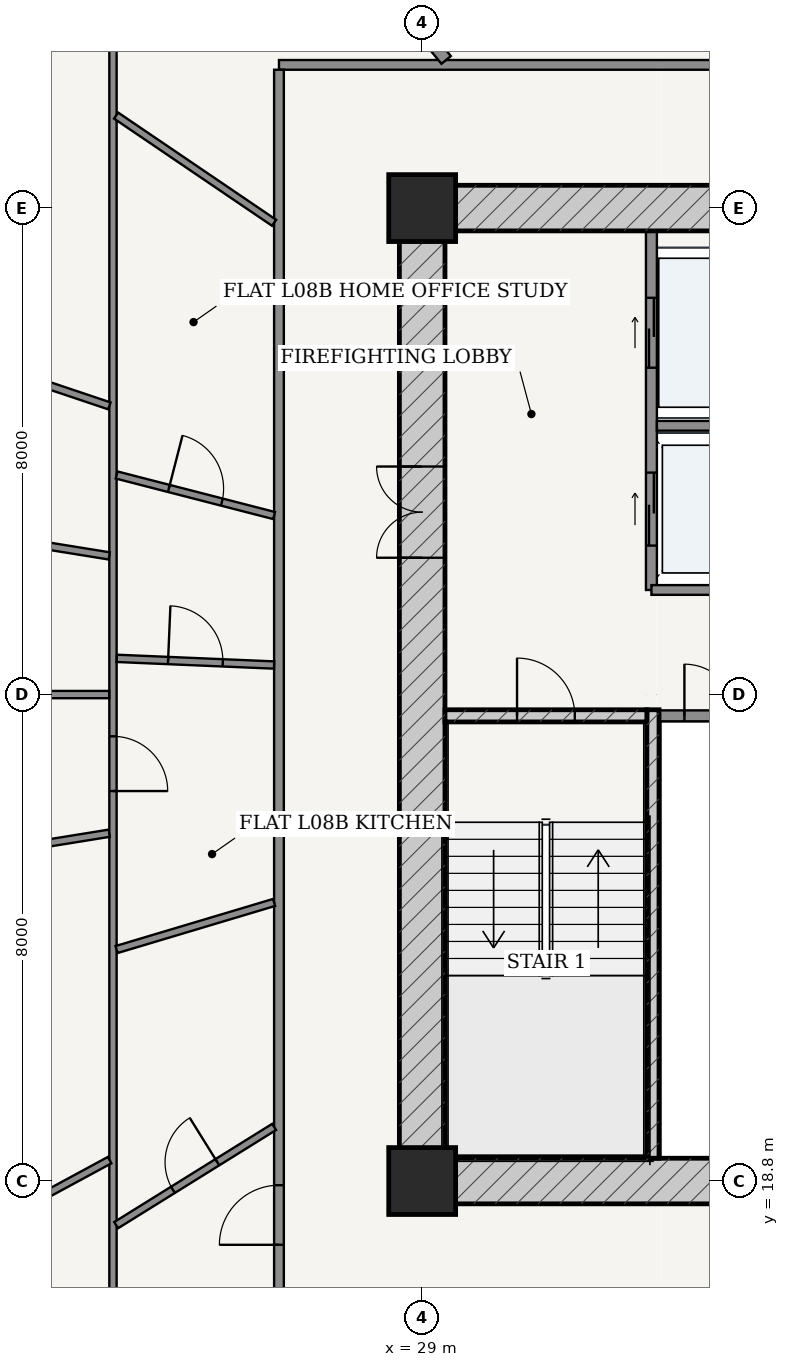
"""IFC4 building model, lengths in metres.
Left out: names, types, materials, properties, quantities, classifications, styles, units other than length and angle.
Written with IfcOpenShell. Run it as: python <this file> out.ifc"""

import sys

from ifc_helpers import new_model, si_unit, direction, frame, frame_2d, origin, origin_2d, place, context, subcontext, project, spatial, rectangle, extrude, source, transform, mapped, element, fill, save


model = new_model("IFC4")
c1 = context("Model", 3, precision=1e-05, world=origin(), true_north=direction((-0.2419218956, 0.970295726276)))
c2 = subcontext(c1, "Body", "Model", "MODEL_VIEW")
j1 = project(units=[si_unit("LENGTHUNIT", "METRE"), si_unit("PLANEANGLEUNIT", "RADIAN")], contexts=[c1])
p1 = place(None, origin())
s1 = spatial("IfcSite", under=j1, at=p1, CompositionType="ELEMENT")
p2 = place(p1, origin())
s2 = spatial("IfcBuilding", under=s1, at=p2, CompositionType="ELEMENT")
p3 = place(p2, frame((0.0, 0.0, 34.8)))
s3 = spatial("IfcBuildingStorey", under=s2, at=p3, CompositionType="ELEMENT", Elevation=34.8)
for number, where, z_axis, x_axis in (
    (1, (29.0, 18.8, 0.0), (0.0, 0.0, 1.0), (1.0, 0.0, 0.0)),
    (2, (29.0, 34.8, 0.0), (0.0, 0.0, 1.0), (1.0, 0.0, 0.0)),
):
    element("IfcColumn", number, at=place(p3, frame(where, z_axis=z_axis, x_axis=x_axis)), inside=s3, PredefinedType="COLUMN", context=c2, shape_type="SweptSolid", body=[
        extrude(rectangle(XDim=1.1, YDim=1.1, at=origin_2d()), origin(), (0.0, 0.0, 1.0), 3.6),
    ])
p4 = place(p3, frame((28.625, 18.8, 0.0), z_axis=(0.0, 0.0, 1.0), x_axis=(1.0, 0.0, 0.0)))
e3 = element("IfcWall", 3, at=p4, inside=s3, PredefinedType="SHEAR", context=c2, shape_type="SweptSolid", body=[
    extrude(rectangle(XDim=18.75, YDim=0.75, at=frame_2d((9.375, 0.0))), origin(), (0.0, 0.0, 1.0), 3.32),
])
p5 = place(p4, frame((6.927, 0.0, 0.0)))
e4 = element("IfcOpeningElement", 4, at=p5, cuts=e3, PredefinedType="OPENING", context=c2, shape_type="SweptSolid", body=[
    extrude(rectangle(XDim=0.85, YDim=2.1, at=frame_2d((0.425, 1.05))), frame((0.0, 0.385, 0.0), z_axis=(0.0, -1.0, 0.0), x_axis=(1.0, 0.0, 0.0)), (0.0, 0.0, 1.0), 0.77),
])
p6 = place(p4, frame((8.95, 0.0, 0.0)))
e5 = element("IfcOpeningElement", 5, at=p6, cuts=e3, PredefinedType="OPENING", context=c2, shape_type="SweptSolid", body=[
    extrude(rectangle(XDim=0.85, YDim=2.1, at=frame_2d((0.425, 1.05))), frame((0.0, 0.385, 0.0), z_axis=(0.0, -1.0, 0.0), x_axis=(1.0, 0.0, 0.0)), (0.0, 0.0, 1.0), 0.77),
])
p7 = place(p4, frame((10.972, 0.0, 0.0)))
e6 = element("IfcOpeningElement", 6, at=p7, cuts=e3, PredefinedType="OPENING", context=c2, shape_type="SweptSolid", body=[
    extrude(rectangle(XDim=0.85, YDim=2.1, at=frame_2d((0.425, 1.05))), frame((0.0, 0.385, 0.0), z_axis=(0.0, -1.0, 0.0), x_axis=(1.0, 0.0, 0.0)), (0.0, 0.0, 1.0), 0.77),
])
p8 = place(p3, frame((28.625, 34.8, 0.0), z_axis=(0.0, 0.0, 1.0), x_axis=(1.0, 0.0, 0.0)))
e7 = element("IfcWall", 7, at=p8, inside=s3, PredefinedType="SHEAR", context=c2, shape_type="SweptSolid", body=[
    extrude(rectangle(XDim=18.75, YDim=0.75, at=frame_2d((9.375, 0.0))), origin(), (0.0, 0.0, 1.0), 3.32),
])
p9 = place(p8, frame((7.407, 0.0, 0.0)))
e8 = element("IfcOpeningElement", 8, at=p9, cuts=e7, PredefinedType="OPENING", context=c2, shape_type="SweptSolid", body=[
    extrude(rectangle(XDim=0.86, YDim=2.1, at=frame_2d((0.43, 1.05))), frame((0.0, 0.385, 0.0), z_axis=(0.0, -1.0, 0.0), x_axis=(1.0, 0.0, 0.0)), (0.0, 0.0, 1.0), 0.77),
])
p10 = place(p8, frame((10.488, 0.0, 0.0)))
e9 = element("IfcOpeningElement", 9, at=p10, cuts=e7, PredefinedType="OPENING", context=c2, shape_type="SweptSolid", body=[
    extrude(rectangle(XDim=0.85, YDim=2.1, at=frame_2d((0.425, 1.05))), frame((0.0, 0.385, 0.0), z_axis=(0.0, -1.0, 0.0), x_axis=(1.0, 0.0, 0.0)), (0.0, 0.0, 1.0), 0.77),
])
p11 = place(p3, frame((29.0, 19.175, 0.0), z_axis=(0.0, 0.0, 1.0), x_axis=(0.0, 1.0, 0.0)))
e10 = element("IfcWall", 10, at=p11, inside=s3, PredefinedType="SHEAR", context=c2, shape_type="SweptSolid", body=[
    extrude(rectangle(XDim=15.25, YDim=0.75, at=frame_2d((7.625, 0.0))), origin(), (0.0, 0.0, 1.0), 3.32),
])
p12 = place(p11, frame((9.875, 0.0, 0.0)))
e11 = element("IfcOpeningElement", 11, at=p12, cuts=e10, PredefinedType="OPENING", context=c2, shape_type="SweptSolid", body=[
    extrude(rectangle(XDim=1.5, YDim=2.2, at=frame_2d((0.75, 1.1))), frame((0.0, 0.385, 0.0), z_axis=(0.0, -1.0, 0.0), x_axis=(1.0, 0.0, 0.0)), (0.0, 0.0, 1.0), 0.77),
])
p13 = place(p3, frame((32.795, 19.175, 0.0), z_axis=(0.0, 0.0, 1.0), x_axis=(0.0, 1.0, 0.0)))
e12 = element("IfcWall", 12, at=p13, inside=s3, PredefinedType="SOLIDWALL", context=c2, shape_type="SweptSolid", body=[
    extrude(rectangle(XDim=7.375, YDim=0.2, at=frame_2d((3.688, 0.0))), origin(), (0.0, 0.0, 1.0), 3.32),
])
p14 = place(p3, frame((29.375, 26.45, 0.0), z_axis=(0.0, 0.0, 1.0), x_axis=(1.0, 0.0, 0.0)))
e13 = element("IfcWall", 13, at=p14, inside=s3, PredefinedType="SOLIDWALL", context=c2, shape_type="SweptSolid", body=[
    extrude(rectangle(XDim=3.32, YDim=0.2, at=frame_2d((1.66, 0.0))), origin(), (0.0, 0.0, 1.0), 3.32),
])
p15 = place(p14, frame((1.185, 0.0, 0.0)))
e14 = element("IfcOpeningElement", 14, at=p15, cuts=e13, PredefinedType="OPENING", context=c2, shape_type="SweptSolid", body=[
    extrude(rectangle(XDim=0.95, YDim=2.15, at=frame_2d((0.475, 1.075))), frame((0.0, 0.11, 0.0), z_axis=(0.0, -1.0, 0.0), x_axis=(1.0, 0.0, 0.0)), (0.0, 0.0, 1.0), 0.22),
])
p16 = place(p3, frame((32.9, 26.45, 0.0), z_axis=(0.0, 0.0, 1.0), x_axis=(1.0, 0.0, 0.0)))
e15 = element("IfcWall", 15, at=p16, inside=s3, PredefinedType="PARTITIONING", context=c2, shape_type="SweptSolid", body=[
    extrude(rectangle(XDim=1.675, YDim=0.18, at=frame_2d((0.837, 0.0))), origin(), (0.0, 0.0, 1.0), 3.32),
])
p17 = place(p16, frame((0.413, 0.0, 0.0)))
e16 = element("IfcOpeningElement", 16, at=p17, cuts=e15, PredefinedType="OPENING", context=c2, shape_type="SweptSolid", body=[
    extrude(rectangle(XDim=0.85, YDim=2.1, at=frame_2d((0.425, 1.05))), frame((0.0, 0.1, 0.0), z_axis=(0.0, -1.0, 0.0), x_axis=(1.0, 0.0, 0.0)), (0.0, 0.0, 1.0), 0.2),
])
p18 = place(p3, frame((32.77, 28.52, 0.0), z_axis=(0.0, 0.0, 1.0), x_axis=(0.0, 1.0, 0.0)))
e17 = element("IfcWall", 17, at=p18, inside=s3, PredefinedType="PARTITIONING", context=c2, shape_type="SweptSolid", body=[
    extrude(rectangle(XDim=5.905, YDim=0.18, at=frame_2d((2.953, 0.0))), origin(), (0.0, 0.0, 1.0), 3.32),
])
p19 = place(p18, frame((3.655, 0.0, 0.0)))
e18 = element("IfcOpeningElement", 18, at=p19, cuts=e17, PredefinedType="OPENING", context=c2, shape_type="SweptSolid", body=[
    extrude(rectangle(XDim=1.15, YDim=2.2, at=frame_2d((0.575, 1.1))), frame((0.0, 0.1, 0.0), z_axis=(0.0, -1.0, 0.0), x_axis=(1.0, 0.0, 0.0)), (0.0, 0.0, 1.0), 0.2),
])
p20 = place(p18, frame((0.73, 0.0, 0.0)))
e19 = element("IfcOpeningElement", 19, at=p20, cuts=e17, PredefinedType="OPENING", context=c2, shape_type="SweptSolid", body=[
    extrude(rectangle(XDim=1.2, YDim=2.25, at=frame_2d((0.6, 1.125))), frame((0.0, 0.1, 0.0), z_axis=(0.0, -1.0, 0.0), x_axis=(1.0, 0.0, 0.0)), (0.0, 0.0, 1.0), 0.2),
])
p21 = place(p3, frame((32.86, 31.22, 0.0), z_axis=(0.0, 0.0, 1.0), x_axis=(1.0, 0.0, 0.0)))
e20 = element("IfcWall", 20, at=p21, inside=s3, PredefinedType="PARTITIONING", context=c2, shape_type="SweptSolid", body=[
    extrude(rectangle(XDim=1.715, YDim=0.16, at=frame_2d((0.857, 0.0))), origin(), (0.0, 0.0, 1.0), 3.32),
])
p22 = place(p3, frame((32.77, 28.52, 0.0), z_axis=(0.0, 0.0, 1.0), x_axis=(1.0, 0.0, 0.0)))
e21 = element("IfcWall", 21, at=p22, inside=s3, PredefinedType="PARTITIONING", context=c2, shape_type="SweptSolid", body=[
    extrude(rectangle(XDim=1.805, YDim=0.16, at=frame_2d((0.902, 0.0))), origin(), (0.0, 0.0, 1.0), 3.32),
])
p23 = place(p3, frame((26.645, 37.155, 0.0), z_axis=(0.0, 0.0, 1.0), x_axis=(1.0, 0.0, 0.0)))
e22 = element("IfcWall", 22, at=p23, inside=s3, PredefinedType="PARTITIONING", context=c2, shape_type="SweptSolid", body=[
    extrude(rectangle(XDim=22.71, YDim=0.16, at=frame_2d((11.355, 0.0))), origin(), (0.0, 0.0, 1.0), 2.688),
])
p24 = place(p3, frame((26.645, 16.525, 0.0), z_axis=(0.0, 0.0, 1.0), x_axis=(0.0, 1.0, 0.0)))
e23 = element("IfcWall", 23, at=p24, inside=s3, PredefinedType="PARTITIONING", context=c2, shape_type="SweptSolid", body=[
    extrude(rectangle(XDim=20.55, YDim=0.16, at=frame_2d((10.275, 0.0))), origin(), (0.0, 0.0, 1.0), 2.688),
])
p25 = place(p24, frame((1.226, 0.0, 0.0)))
e24 = element("IfcOpeningElement", 24, at=p25, cuts=e23, PredefinedType="OPENING", context=c2, shape_type="SweptSolid", body=[
    extrude(rectangle(XDim=0.98, YDim=2.2, at=frame_2d((0.49, 1.1))), frame((0.0, 0.09, 0.0), z_axis=(0.0, -1.0, 0.0), x_axis=(1.0, 0.0, 0.0)), (0.0, 0.0, 1.0), 0.18),
])
p26 = place(p3, frame((34.549, 37.237, 0.0), z_axis=(0.0, 0.0, 1.0), x_axis=(-0.313863409377, 0.949468145992, 0.0)))
e25 = element("IfcWall", 25, at=p26, inside=s3, PredefinedType="PARTITIONING", context=c2, shape_type="SweptSolid", body=[
    extrude(rectangle(XDim=2.727, YDim=0.12, at=frame_2d((1.364, 0.0))), origin(), (0.0, 0.0, 1.0), 3.32),
])
p27 = place(p26, frame((0.934, 0.0, 0.0)))
e26 = element("IfcOpeningElement", 26, at=p27, cuts=e25, PredefinedType="OPENING", context=c2, shape_type="SweptSolid", body=[
    extrude(rectangle(XDim=0.86, YDim=2.15, at=frame_2d((0.43, 1.075))), frame((0.0, 0.07, 0.0), z_axis=(0.0, -1.0, 0.0), x_axis=(1.0, 0.0, 0.0)), (0.0, 0.0, 1.0), 0.14),
])
p28 = place(p3, frame((29.395, 37.237, 0.0), z_axis=(0.0, 0.0, 1.0), x_axis=(-0.636195770442, 0.77152766747, 0.0)))
e27 = element("IfcWall", 27, at=p28, inside=s3, PredefinedType="PARTITIONING", context=c2, shape_type="SweptSolid", body=[
    extrude(rectangle(XDim=11.681, YDim=0.2, at=frame_2d((5.84, 0.0))), origin(), (0.0, 0.0, 1.0), 2.688),
])
p29 = place(p3, frame((23.915, 13.715, 0.0), z_axis=(0.0, 0.0, 1.0), x_axis=(0.0, 1.0, 0.0)))
e28 = element("IfcWall", 28, at=p29, inside=s3, PredefinedType="PARTITIONING", context=c2, shape_type="SweptSolid", body=[
    extrude(rectangle(XDim=26.17, YDim=0.12, at=frame_2d((13.085, 0.0))), origin(), (0.0, 0.0, 1.0), 2.688),
])
p30 = place(p29, frame((1.895, 0.0, 0.0)))
e29 = element("IfcOpeningElement", 29, at=p30, cuts=e28, PredefinedType="OPENING", context=c2, shape_type="SweptSolid", body=[
    extrude(rectangle(XDim=0.9, YDim=2.15, at=frame_2d((0.45, 1.075))), frame((0.0, 0.07, 0.0), z_axis=(0.0, -1.0, 0.0), x_axis=(1.0, 0.0, 0.0)), (0.0, 0.0, 1.0), 0.14),
])
p31 = place(p29, frame((11.498, 0.0, 0.0)))
e30 = element("IfcOpeningElement", 30, at=p31, cuts=e28, PredefinedType="OPENING", context=c2, shape_type="SweptSolid", body=[
    extrude(rectangle(XDim=0.9, YDim=2.15, at=frame_2d((0.45, 1.075))), frame((0.0, 0.07, 0.0), z_axis=(0.0, -1.0, 0.0), x_axis=(1.0, 0.0, 0.0)), (0.0, 0.0, 1.0), 0.14),
])
p32 = place(p29, frame((23.831, 0.0, 0.0)))
e31 = element("IfcOpeningElement", 31, at=p32, cuts=e28, PredefinedType="OPENING", context=c2, shape_type="SweptSolid", body=[
    extrude(rectangle(XDim=0.86, YDim=2.15, at=frame_2d((0.43, 1.075))), frame((0.0, 0.07, 0.0), z_axis=(0.0, -1.0, 0.0), x_axis=(1.0, 0.0, 0.0)), (0.0, 0.0, 1.0), 0.14),
])
p33 = place(p3, frame((23.856, 31.547, 0.0), z_axis=(0.0, 0.0, 1.0), x_axis=(-0.948017487737, 0.318218231634, 0.0)))
e32 = element("IfcWall", 32, at=p33, inside=s3, PredefinedType="PARTITIONING", context=c2, shape_type="SweptSolid", body=[
    extrude(rectangle(XDim=13.279, YDim=0.12, at=frame_2d((6.639, 0.0))), origin(), (0.0, 0.0, 1.0), 2.762),
])
p34 = place(p33, frame((6.189, 0.0, 0.0)))
e33 = element("IfcOpeningElement", 33, at=p34, cuts=e32, PredefinedType="OPENING", context=c2, shape_type="SweptSolid", body=[
    extrude(rectangle(XDim=0.9, YDim=2.15, at=frame_2d((0.45, 1.075))), frame((0.0, 0.07, 0.0), z_axis=(0.0, -1.0, 0.0), x_axis=(1.0, 0.0, 0.0)), (0.0, 0.0, 1.0), 0.14),
])
p35 = place(p3, frame((23.854, 29.08, 0.0), z_axis=(0.0, 0.0, 1.0), x_axis=(-0.987255773689, 0.159141563768, 0.0)))
e34 = element("IfcWall", 34, at=p35, inside=s3, PredefinedType="PARTITIONING", context=c2, shape_type="SweptSolid", body=[
    extrude(rectangle(XDim=14.359, YDim=0.12, at=frame_2d((7.18, 0.0))), origin(), (0.0, 0.0, 1.0), 2.688),
])
p36 = place(p35, frame((5.66, 0.0, 0.0)))
e35 = element("IfcOpeningElement", 35, at=p36, cuts=e34, PredefinedType="OPENING", context=c2, shape_type="SweptSolid", body=[
    extrude(rectangle(XDim=0.9, YDim=2.15, at=frame_2d((0.45, 1.075))), frame((0.0, 0.07, 0.0), z_axis=(0.0, -1.0, 0.0), x_axis=(1.0, 0.0, 0.0)), (0.0, 0.0, 1.0), 0.14),
])
p37 = place(p3, frame((23.853, 26.8, 0.0), z_axis=(0.0, 0.0, 1.0), x_axis=(-1.0, 0.0, 0.0)))
e36 = element("IfcWall", 36, at=p37, inside=s3, PredefinedType="PARTITIONING", context=c2, shape_type="SweptSolid", body=[
    extrude(rectangle(XDim=14.793, YDim=0.12, at=frame_2d((7.396, 0.0))), origin(), (0.0, 0.0, 1.0), 2.762),
])
p38 = place(p37, frame((6.947, 0.0, 0.0)))
e37 = element("IfcOpeningElement", 37, at=p38, cuts=e36, PredefinedType="OPENING", context=c2, shape_type="SweptSolid", body=[
    extrude(rectangle(XDim=0.9, YDim=2.15, at=frame_2d((0.45, 1.075))), frame((0.0, 0.07, 0.0), z_axis=(0.0, -1.0, 0.0), x_axis=(1.0, 0.0, 0.0)), (0.0, 0.0, 1.0), 0.14),
])
p39 = place(p3, frame((23.854, 24.52, 0.0), z_axis=(0.0, 0.0, 1.0), x_axis=(-0.987258444847, -0.159124991997, 0.0)))
e38 = element("IfcWall", 38, at=p39, inside=s3, PredefinedType="PARTITIONING", context=c2, shape_type="SweptSolid", body=[
    extrude(rectangle(XDim=14.359, YDim=0.12, at=frame_2d((7.18, 0.0))), origin(), (0.0, 0.0, 1.0), 2.688),
])
p40 = place(p39, frame((5.659, 0.0, 0.0)))
e39 = element("IfcOpeningElement", 39, at=p40, cuts=e38, PredefinedType="OPENING", context=c2, shape_type="SweptSolid", body=[
    extrude(rectangle(XDim=0.9, YDim=2.15, at=frame_2d((0.45, 1.075))), frame((0.0, 0.07, 0.0), z_axis=(0.0, -1.0, 0.0), x_axis=(1.0, 0.0, 0.0)), (0.0, 0.0, 1.0), 0.14),
])
p41 = place(p3, frame((23.861, 19.144, 0.0), z_axis=(0.0, 0.0, 1.0), x_axis=(-0.879372452045, -0.476134529922, 0.0)))
e40 = element("IfcWall", 40, at=p41, inside=s3, PredefinedType="PARTITIONING", context=c2, shape_type="SweptSolid", body=[
    extrude(rectangle(XDim=11.219, YDim=0.12, at=frame_2d((5.61, 0.0))), origin(), (0.0, 0.0, 1.0), 2.688),
])
p42 = place(p41, frame((4.097, 0.0, 0.0)))
e41 = element("IfcOpeningElement", 41, at=p42, cuts=e40, PredefinedType="OPENING", context=c2, shape_type="SweptSolid", body=[
    extrude(rectangle(XDim=0.9, YDim=2.15, at=frame_2d((0.45, 1.075))), frame((0.0, 0.07, 0.0), z_axis=(0.0, -1.0, 0.0), x_axis=(1.0, 0.0, 0.0)), (0.0, 0.0, 1.0), 0.14),
])
p43 = place(p3, frame((26.565, 34.558, 0.0), z_axis=(0.0, 0.0, 1.0), x_axis=(-0.827501574847, 0.561463394734, 0.0)))
e42 = element("IfcWall", 42, at=p43, inside=s3, PredefinedType="PARTITIONING", context=c2, shape_type="SweptSolid", body=[
    extrude(rectangle(XDim=3.14, YDim=0.12, at=frame_2d((1.57, 0.0))), origin(), (0.0, 0.0, 1.0), 3.32),
])
p44 = place(p3, frame((26.565, 29.744, 0.0), z_axis=(0.0, 0.0, 1.0), x_axis=(-0.968421803088, 0.249317490972, 0.0)))
e43 = element("IfcWall", 43, at=p44, inside=s3, PredefinedType="PARTITIONING", context=c2, shape_type="SweptSolid", body=[
    extrude(rectangle(XDim=2.674, YDim=0.12, at=frame_2d((1.337, 0.0))), origin(), (0.0, 0.0, 1.0), 3.32),
])
p45 = place(p44, frame((0.887, 0.0, 0.0)))
e44 = element("IfcOpeningElement", 44, at=p45, cuts=e43, PredefinedType="OPENING", context=c2, shape_type="SweptSolid", body=[
    extrude(rectangle(XDim=0.9, YDim=2.15, at=frame_2d((0.45, 1.075))), frame((0.0, 0.07, 0.0), z_axis=(0.0, -1.0, 0.0), x_axis=(1.0, 0.0, 0.0)), (0.0, 0.0, 1.0), 0.14),
])
p46 = place(p3, frame((26.565, 27.286, 0.0), z_axis=(0.0, 0.0, 1.0), x_axis=(-0.999100094808, 0.042414626666, 0.0)))
e45 = element("IfcWall", 45, at=p46, inside=s3, PredefinedType="PARTITIONING", context=c2, shape_type="SweptSolid", body=[
    extrude(rectangle(XDim=2.59, YDim=0.12, at=frame_2d((1.295, 0.0))), origin(), (0.0, 0.0, 1.0), 3.32),
])
p47 = place(p46, frame((0.845, 0.0, 0.0)))
e46 = element("IfcOpeningElement", 46, at=p47, cuts=e45, PredefinedType="OPENING", context=c2, shape_type="SweptSolid", body=[
    extrude(rectangle(XDim=0.9, YDim=2.15, at=frame_2d((0.45, 1.075))), frame((0.0, 0.07, 0.0), z_axis=(0.0, -1.0, 0.0), x_axis=(1.0, 0.0, 0.0)), (0.0, 0.0, 1.0), 0.14),
])
p48 = place(p3, frame((26.565, 23.382, 0.0), z_axis=(0.0, 0.0, 1.0), x_axis=(-0.958081868855, -0.286494559408, 0.0)))
e47 = element("IfcWall", 47, at=p48, inside=s3, PredefinedType="PARTITIONING", context=c2, shape_type="SweptSolid", body=[
    extrude(rectangle(XDim=2.704, YDim=0.12, at=frame_2d((1.352, 0.0))), origin(), (0.0, 0.0, 1.0), 3.32),
])
p49 = place(p3, frame((26.565, 19.69, 0.0), z_axis=(0.0, 0.0, 1.0), x_axis=(-0.849229217796, -0.52802437031, 0.0)))
e48 = element("IfcWall", 48, at=p49, inside=s3, PredefinedType="PARTITIONING", context=c2, shape_type="SweptSolid", body=[
    extrude(rectangle(XDim=3.059, YDim=0.12, at=frame_2d((1.529, 0.0))), origin(), (0.0, 0.0, 1.0), 3.32),
])
p50 = place(p49, frame((1.099, 0.0, 0.0)))
e49 = element("IfcOpeningElement", 49, at=p50, cuts=e48, PredefinedType="OPENING", context=c2, shape_type="SweptSolid", body=[
    extrude(rectangle(XDim=0.86, YDim=2.15, at=frame_2d((0.43, 1.075))), frame((0.0, 0.07, 0.0), z_axis=(0.0, -1.0, 0.0), x_axis=(1.0, 0.0, 0.0)), (0.0, 0.0, 1.0), 0.14),
])
m1 = source(origin(), c2, "Body", "SweptSolid", [
    extrude(rectangle(XDim=1.5, YDim=2.2, at=frame_2d((0.75, 1.1))), frame((0.0, 0.025, 0.0), z_axis=(0.0, -1.0, 0.0), x_axis=(1.0, 0.0, 0.0)), (0.0, 0.0, 1.0), 0.05),
])
p51 = place(p12, origin())
e50 = element("IfcDoor", 50, at=p51, inside=s3, OperationType="DOUBLE_DOOR_SINGLE_SWING", PredefinedType="DOOR", context=c2, shape_type="MappedRepresentation", body=[
    mapped(m1, transform((0.0, 0.0, 0.0), scale=1.0)),
])
fill(e11, e50)
m2 = source(origin(), c2, "Body", "SweptSolid", [
    extrude(rectangle(XDim=0.95, YDim=2.15, at=frame_2d((0.475, 1.075))), frame((0.0, 0.025, 0.0), z_axis=(0.0, -1.0, 0.0), x_axis=(1.0, 0.0, 0.0)), (0.0, 0.0, 1.0), 0.05),
])
p52 = place(p15, origin())
e51 = element("IfcDoor", 51, at=p52, inside=s3, OperationType="SINGLE_SWING_LEFT", PredefinedType="DOOR", context=c2, shape_type="MappedRepresentation", body=[
    mapped(m2, transform((0.0, 0.0, 0.0), scale=1.0)),
])
fill(e14, e51)
m3 = source(origin(), c2, "Body", "SweptSolid", [
    extrude(rectangle(XDim=0.85, YDim=2.1, at=frame_2d((0.425, 1.05))), frame((0.0, 0.025, 0.0), z_axis=(0.0, -1.0, 0.0), x_axis=(1.0, 0.0, 0.0)), (0.0, 0.0, 1.0), 0.05),
])
p53 = place(p17, origin())
e52 = element("IfcDoor", 52, at=p53, inside=s3, OperationType="SINGLE_SWING_LEFT", PredefinedType="DOOR", context=c2, shape_type="MappedRepresentation", body=[
    mapped(m3, transform((0.0, 0.0, 0.0), scale=1.0)),
])
fill(e16, e52)
m4 = source(origin(), c2, "Body", "SweptSolid", [
    extrude(rectangle(XDim=1.15, YDim=2.2, at=frame_2d((0.575, 1.1))), frame((0.0, 0.025, 0.0), z_axis=(0.0, -1.0, 0.0), x_axis=(1.0, 0.0, 0.0)), (0.0, 0.0, 1.0), 0.05),
])
p54 = place(p19, origin())
e53 = element("IfcDoor", 53, at=p54, inside=s3, OperationType="DOUBLE_DOOR_SLIDING", PredefinedType="DOOR", context=c2, shape_type="MappedRepresentation", body=[
    mapped(m4, transform((0.0, 0.0, 0.0), scale=1.0)),
])
fill(e18, e53)
m5 = source(origin(), c2, "Body", "SweptSolid", [
    extrude(rectangle(XDim=1.2, YDim=2.25, at=frame_2d((0.6, 1.125))), frame((0.0, 0.025, 0.0), z_axis=(0.0, -1.0, 0.0), x_axis=(1.0, 0.0, 0.0)), (0.0, 0.0, 1.0), 0.05),
])
p55 = place(p20, origin())
e54 = element("IfcDoor", 54, at=p55, inside=s3, OperationType="DOUBLE_DOOR_SLIDING", PredefinedType="DOOR", context=c2, shape_type="MappedRepresentation", body=[
    mapped(m5, transform((0.0, 0.0, 0.0), scale=1.0)),
])
fill(e19, e54)
m6 = source(origin(), c2, "Body", "SweptSolid", [
    extrude(rectangle(XDim=0.98, YDim=2.2, at=frame_2d((0.49, 1.1))), frame((0.0, 0.025, 0.0), z_axis=(0.0, -1.0, 0.0), x_axis=(1.0, 0.0, 0.0)), (0.0, 0.0, 1.0), 0.05),
])
p56 = place(p25, origin())
e55 = element("IfcDoor", 55, at=p56, inside=s3, OperationType="SINGLE_SWING_LEFT", PredefinedType="DOOR", context=c2, shape_type="MappedRepresentation", body=[
    mapped(m6, transform((0.0, 0.0, 0.0), scale=1.0)),
])
fill(e24, e55)
m7 = source(origin(), c2, "Body", "SweptSolid", [
    extrude(rectangle(XDim=0.86, YDim=2.15, at=frame_2d((0.43, 1.075))), frame((0.0, 0.025, 0.0), z_axis=(0.0, -1.0, 0.0), x_axis=(1.0, 0.0, 0.0)), (0.0, 0.0, 1.0), 0.05),
])
p57 = place(p50, frame((0.86, 0.0, 0.0), z_axis=(0.0, 0.0, 1.0), x_axis=(-1.0, 0.0, 0.0)))
e56 = element("IfcDoor", 56, at=p57, inside=s3, OperationType="SINGLE_SWING_RIGHT", PredefinedType="DOOR", context=c2, shape_type="MappedRepresentation", body=[
    mapped(m7, transform((0.0, 0.0, 0.0), scale=1.0)),
])
fill(e49, e56)
m8 = source(origin(), c2, "Body", "SweptSolid", [
    extrude(rectangle(XDim=0.9, YDim=2.15, at=frame_2d((0.45, 1.075))), frame((0.0, 0.025, 0.0), z_axis=(0.0, -1.0, 0.0), x_axis=(1.0, 0.0, 0.0)), (0.0, 0.0, 1.0), 0.05),
])
p58 = place(p31, frame((0.9, 0.0, 0.0), z_axis=(0.0, 0.0, 1.0), x_axis=(-1.0, 0.0, 0.0)))
e57 = element("IfcDoor", 57, at=p58, inside=s3, OperationType="SINGLE_SWING_RIGHT", PredefinedType="DOOR", context=c2, shape_type="MappedRepresentation", body=[
    mapped(m8, transform((0.0, 0.0, 0.0), scale=1.0)),
])
fill(e30, e57)
p59 = place(p47, frame((0.9, 0.0, 0.0), z_axis=(0.0, 0.0, 1.0), x_axis=(-1.0, 0.0, 0.0)))
e58 = element("IfcDoor", 58, at=p59, inside=s3, OperationType="SINGLE_SWING_LEFT", PredefinedType="DOOR", context=c2, shape_type="MappedRepresentation", body=[
    mapped(m8, transform((0.0, 0.0, 0.0), scale=1.0)),
])
fill(e46, e58)
p60 = place(p45, frame((0.9, 0.0, 0.0), z_axis=(0.0, 0.0, 1.0), x_axis=(-1.0, 0.0, 0.0)))
e59 = element("IfcDoor", 59, at=p60, inside=s3, OperationType="SINGLE_SWING_LEFT", PredefinedType="DOOR", context=c2, shape_type="MappedRepresentation", body=[
    mapped(m8, transform((0.0, 0.0, 0.0), scale=1.0)),
])
fill(e44, e59)
save(model, sys.argv[1])
